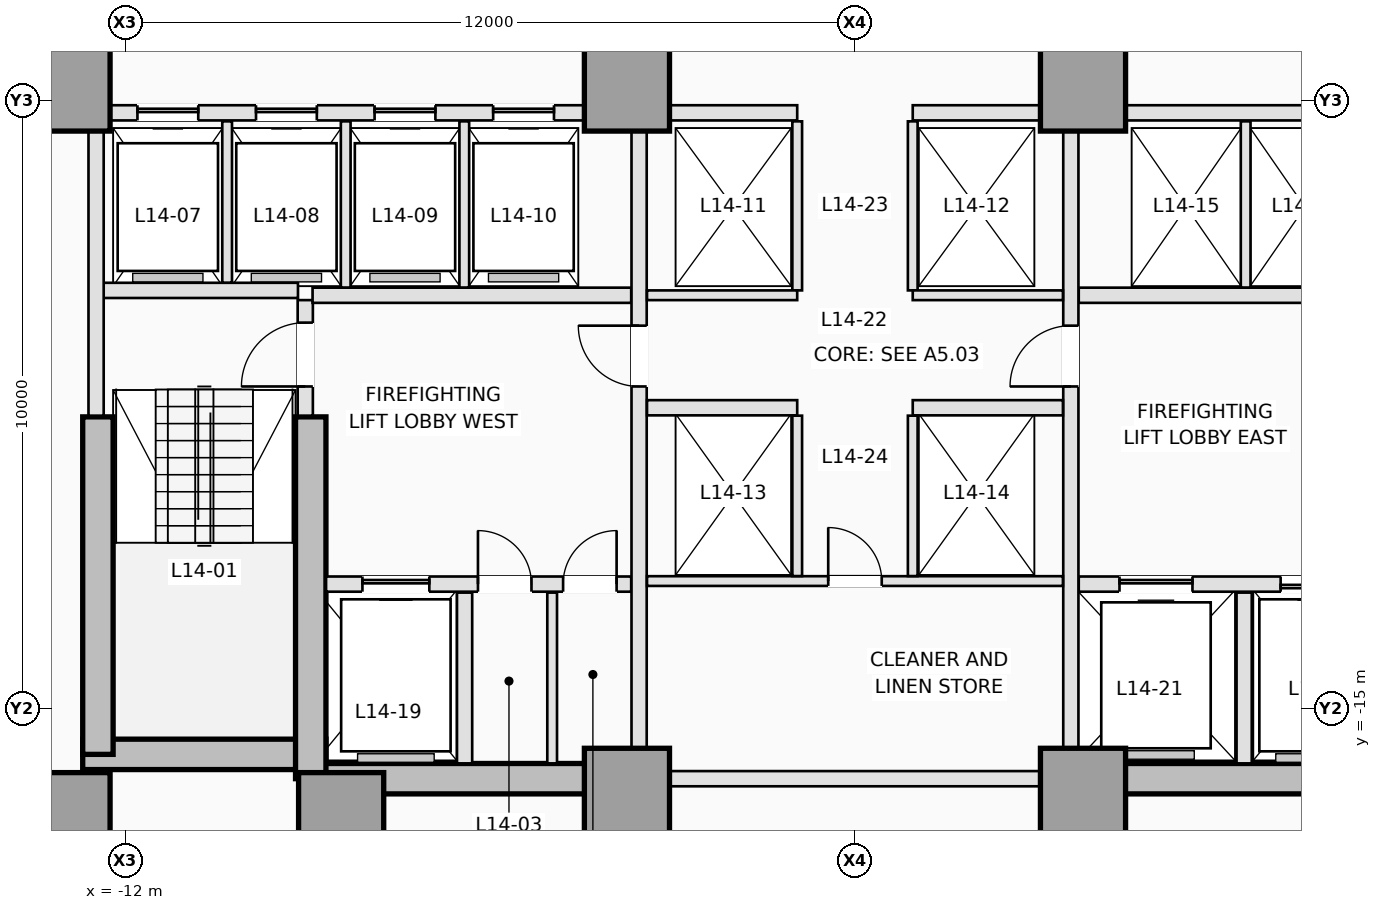
"""IFC4 building model, lengths in metres.
Left out: names, types, materials, properties, quantities, classifications, styles, units other than length and angle.
Written with IfcOpenShell. Run it as: python <this file> out.ifc"""

import sys

from ifc_helpers import new_model, si_unit, direction, frame, frame_2d, origin, origin_2d, place, context, subcontext, project, spatial, rectangle, extrude, element, fill, save


model = new_model("IFC4")
c1 = context("Model", 3, precision=1e-05, world=origin(), true_north=direction((0.0, 1.0)))
c2 = subcontext(c1, "Body", "Model", "MODEL_VIEW")
j1 = project(units=[si_unit("LENGTHUNIT", "METRE"), si_unit("PLANEANGLEUNIT", "RADIAN")], contexts=[c1])
p1 = place(None, origin())
s1 = spatial("IfcSite", under=j1, at=p1, CompositionType="ELEMENT")
p2 = place(p1, origin())
s2 = spatial("IfcBuilding", under=s1, at=p2, CompositionType="ELEMENT")
p3 = place(p2, frame((0.0, 0.0, 55.6)))
s3 = spatial("IfcBuildingStorey", under=s2, at=p3, CompositionType="ELEMENT", Elevation=55.6)
p4 = place(p3, frame((-12.7, -15.75, 0.0), z_axis=(0.0, 0.0, 1.0), x_axis=(1.0, 0.0, 0.0)))
e1 = element("IfcWall", 1, at=p4, inside=s3, PredefinedType="SHEAR", context=c2, shape_type="SweptSolid", body=[
    extrude(rectangle(XDim=4.0, YDim=0.5, at=frame_2d((2.0, 0.0))), origin(), (0.0, 0.0, 1.0), 3.5),
])
for number, where, z_axis, x_axis in (
    (2, (-8.95, -16.15, 0.0), (0.0, 0.0, 1.0), (1.0, 0.0, 0.0)),
    (3, (3.75, -16.15, 0.0), (0.0, 0.0, 1.0), (1.0, 0.0, 0.0)),
):
    element("IfcWall", number, at=place(p3, frame(where, z_axis=z_axis, x_axis=x_axis)), inside=s3, PredefinedType="SHEAR", context=c2, shape_type="SweptSolid", body=[
        extrude(rectangle(XDim=5.2, YDim=0.5, at=frame_2d((2.6, 0.0))), origin(), (0.0, 0.0, 1.0), 3.5),
    ])
p5 = place(p3, frame((-12.45, -15.75, 0.0), z_axis=(0.0, 0.0, 1.0), x_axis=(0.0, 1.0, 0.0)))
e4 = element("IfcWall", 4, at=p5, inside=s3, PredefinedType="SHEAR", context=c2, shape_type="SweptSolid", body=[
    extrude(rectangle(XDim=5.55, YDim=0.5, at=frame_2d((2.775, 0.0))), origin(), (0.0, 0.0, 1.0), 3.5),
])
p6 = place(p3, frame((-8.95, -16.15, 0.0), z_axis=(0.0, 0.0, 1.0), x_axis=(0.0, 1.0, 0.0)))
e5 = element("IfcWall", 5, at=p6, inside=s3, PredefinedType="SHEAR", context=c2, shape_type="SweptSolid", body=[
    extrude(rectangle(XDim=5.95, YDim=0.5, at=frame_2d((2.975, 0.0))), origin(), (0.0, 0.0, 1.0), 3.5),
])
for number, where, z_axis, x_axis in (
    (6, (-12.95, -16.75, 0.0), (0.0, 0.0, 1.0), (1.0, 0.0, 0.0)),
    (7, (-8.45, -16.75, 0.0), (0.0, 0.0, 1.0), (1.0, 0.0, 0.0)),
    (8, (-3.75, -16.35, 0.0), (0.0, 0.0, 1.0), (1.0, 0.0, 0.0)),
    (9, (3.75, -16.35, 0.0), (0.0, 0.0, 1.0), (1.0, 0.0, 0.0)),
    (10, (-12.95, -4.8, 0.0), (0.0, 0.0, 1.0), (1.0, 0.0, 0.0)),
    (11, (-3.75, -4.8, 0.0), (0.0, 0.0, 1.0), (1.0, 0.0, 0.0)),
    (12, (3.75, -4.8, 0.0), (0.0, 0.0, 1.0), (1.0, 0.0, 0.0)),
):
    element("IfcColumn", number, at=place(p3, frame(where, z_axis=z_axis, x_axis=x_axis)), inside=s3, PredefinedType="COLUMN", context=c2, shape_type="SweptSolid", body=[
        extrude(rectangle(XDim=1.4, YDim=1.4, at=origin_2d()), origin(), (0.0, 0.0, 1.0), 3.5),
    ])
p7 = place(p3, frame((-9.04, -10.18, 0.0), z_axis=(0.0, 0.0, 1.0), x_axis=(0.0, 1.0, 0.0)))
e13 = element("IfcWall", 13, at=p7, inside=s3, PredefinedType="PARTITIONING", context=c2, shape_type="SweptSolid", body=[
    extrude(rectangle(XDim=1.9, YDim=0.25, at=frame_2d((0.95, 0.0))), origin(), (0.0, 0.0, 1.0), 3.25),
])
p8 = place(p7, frame((0.48, 0.0, 0.0)))
e14 = element("IfcOpeningElement", 14, at=p8, cuts=e13, PredefinedType="OPENING", context=c2, shape_type="SweptSolid", body=[
    extrude(rectangle(XDim=1.05, YDim=2.15, at=frame_2d((0.525, 1.075))), frame((0.0, 0.135, 0.0), z_axis=(0.0, -1.0, 0.0), x_axis=(1.0, 0.0, 0.0)), (0.0, 0.0, 1.0), 0.27),
])
p9 = place(p3, frame((-12.38, -8.12, 0.0), z_axis=(0.0, 0.0, 1.0), x_axis=(1.0, 0.0, 0.0)))
e15 = element("IfcWall", 15, at=p9, inside=s3, PredefinedType="PARTITIONING", context=c2, shape_type="SweptSolid", body=[
    extrude(rectangle(XDim=3.22, YDim=0.25, at=frame_2d((1.61, 0.0))), origin(), (0.0, 0.0, 1.0), 3.25),
])
p10 = place(p3, frame((-12.48, -10.18, 0.0), z_axis=(0.0, 0.0, 1.0), x_axis=(0.0, 1.0, 0.0)))
e16 = element("IfcWall", 16, at=p10, inside=s3, PredefinedType="PARTITIONING", context=c2, shape_type="SweptSolid", body=[
    extrude(rectangle(XDim=4.678, YDim=0.25, at=frame_2d((2.339, 0.0))), origin(), (0.0, 0.0, 1.0), 3.25),
])
p11 = place(p3, frame((-8.698, -12.95, 0.0), z_axis=(0.0, 0.0, 1.0), x_axis=(1.0, 0.0, 0.0)))
e17 = element("IfcWall", 17, at=p11, inside=s3, PredefinedType="PARTITIONING", context=c2, shape_type="SweptSolid", body=[
    extrude(rectangle(XDim=5.018, YDim=0.25, at=frame_2d((2.509, 0.0))), origin(), (0.0, 0.0, 1.0), 3.25),
])
p12 = place(p11, frame((0.598, 0.0, 0.0)))
e18 = element("IfcOpeningElement", 18, at=p12, cuts=e17, PredefinedType="OPENING", context=c2, shape_type="SweptSolid", body=[
    extrude(rectangle(XDim=1.1, YDim=2.15, at=frame_2d((0.55, 1.075))), frame((0.0, 0.135, 0.0), z_axis=(0.0, -1.0, 0.0), x_axis=(1.0, 0.0, 0.0)), (0.0, 0.0, 1.0), 0.27),
])
p13 = place(p11, frame((2.498, 0.0, 0.0)))
e19 = element("IfcOpeningElement", 19, at=p13, cuts=e17, PredefinedType="OPENING", context=c2, shape_type="SweptSolid", body=[
    extrude(rectangle(XDim=0.88, YDim=2.1, at=frame_2d((0.44, 1.05))), frame((0.0, 0.135, 0.0), z_axis=(0.0, -1.0, 0.0), x_axis=(1.0, 0.0, 0.0)), (0.0, 0.0, 1.0), 0.27),
])
p14 = place(p11, frame((3.898, 0.0, 0.0)))
e20 = element("IfcOpeningElement", 20, at=p14, cuts=e17, PredefinedType="OPENING", context=c2, shape_type="SweptSolid", body=[
    extrude(rectangle(XDim=0.88, YDim=2.1, at=frame_2d((0.44, 1.05))), frame((0.0, 0.135, 0.0), z_axis=(0.0, -1.0, 0.0), x_axis=(1.0, 0.0, 0.0)), (0.0, 0.0, 1.0), 0.27),
])
p15 = place(p3, frame((3.68, -12.95, 0.0), z_axis=(0.0, 0.0, 1.0), x_axis=(1.0, 0.0, 0.0)))
e21 = element("IfcWall", 21, at=p15, inside=s3, PredefinedType="PARTITIONING", context=c2, shape_type="SweptSolid", body=[
    extrude(rectangle(XDim=5.018, YDim=0.25, at=frame_2d((2.509, 0.0))), origin(), (0.0, 0.0, 1.0), 3.25),
])
p16 = place(p15, frame((3.32, 0.0, 0.0)))
e22 = element("IfcOpeningElement", 22, at=p16, cuts=e21, PredefinedType="OPENING", context=c2, shape_type="SweptSolid", body=[
    extrude(rectangle(XDim=1.1, YDim=2.15, at=frame_2d((0.55, 1.075))), frame((0.0, 0.135, 0.0), z_axis=(0.0, -1.0, 0.0), x_axis=(1.0, 0.0, 0.0)), (0.0, 0.0, 1.0), 0.27),
])
p17 = place(p15, frame((0.67, 0.0, 0.0)))
e23 = element("IfcOpeningElement", 23, at=p17, cuts=e21, PredefinedType="OPENING", context=c2, shape_type="SweptSolid", body=[
    extrude(rectangle(XDim=1.2, YDim=2.15, at=frame_2d((0.6, 1.075))), frame((0.0, 0.135, 0.0), z_axis=(0.0, -1.0, 0.0), x_axis=(1.0, 0.0, 0.0)), (0.0, 0.0, 1.0), 0.27),
])
p18 = place(p3, frame((-6.42, -15.898, 0.0), z_axis=(0.0, 0.0, 1.0), x_axis=(0.0, 1.0, 0.0)))
e24 = element("IfcWall", 24, at=p18, inside=s3, PredefinedType="PARTITIONING", context=c2, shape_type="SweptSolid", body=[
    extrude(rectangle(XDim=2.808, YDim=0.25, at=frame_2d((1.404, 0.0))), origin(), (0.0, 0.0, 1.0), 3.25),
])
p19 = place(p3, frame((-4.98, -15.898, 0.0), z_axis=(0.0, 0.0, 1.0), x_axis=(0.0, 1.0, 0.0)))
e25 = element("IfcWall", 25, at=p19, inside=s3, PredefinedType="PARTITIONING", context=c2, shape_type="SweptSolid", body=[
    extrude(rectangle(XDim=2.808, YDim=0.16, at=frame_2d((1.404, 0.0))), origin(), (0.0, 0.0, 1.0), 3.25),
])
p20 = place(p3, frame((6.4, -15.898, 0.0), z_axis=(0.0, 0.0, 1.0), x_axis=(0.0, 1.0, 0.0)))
e26 = element("IfcWall", 26, at=p20, inside=s3, PredefinedType="PARTITIONING", context=c2, shape_type="SweptSolid", body=[
    extrude(rectangle(XDim=2.808, YDim=0.25, at=frame_2d((1.404, 0.0))), origin(), (0.0, 0.0, 1.0), 3.25),
])
for number, where, z_axis, x_axis in (
    (27, (-8.92, -8.2, 0.0), (0.0, 0.0, 1.0), (1.0, 0.0, 0.0)),
    (28, (3.68, -8.2, 0.0), (0.0, 0.0, 1.0), (1.0, 0.0, 0.0)),
):
    element("IfcWall", number, at=place(p3, frame(where, z_axis=z_axis, x_axis=x_axis)), inside=s3, PredefinedType="PARTITIONING", context=c2, shape_type="SweptSolid", body=[
        extrude(rectangle(XDim=5.24, YDim=0.25, at=frame_2d((2.62, 0.0))), origin(), (0.0, 0.0, 1.0), 3.25),
    ])
p21 = place(p3, frame((-3.55, -15.648, 0.0), z_axis=(0.0, 0.0, 1.0), x_axis=(0.0, 1.0, 0.0)))
e29 = element("IfcWall", 29, at=p21, inside=s3, PredefinedType="PARTITIONING", context=c2, shape_type="SweptSolid", body=[
    extrude(rectangle(XDim=10.146, YDim=0.25, at=frame_2d((5.073, 0.0))), origin(), (0.0, 0.0, 1.0), 3.25),
])
p22 = place(p21, frame((5.948, 0.0, 0.0)))
e30 = element("IfcOpeningElement", 30, at=p22, cuts=e29, PredefinedType="OPENING", context=c2, shape_type="SweptSolid", body=[
    extrude(rectangle(XDim=1.0, YDim=2.15, at=frame_2d((0.5, 1.075))), frame((0.0, 0.135, 0.0), z_axis=(0.0, -1.0, 0.0), x_axis=(1.0, 0.0, 0.0)), (0.0, 0.0, 1.0), 0.27),
])
p23 = place(p3, frame((3.55, -15.648, 0.0), z_axis=(0.0, 0.0, 1.0), x_axis=(0.0, 1.0, 0.0)))
e31 = element("IfcWall", 31, at=p23, inside=s3, PredefinedType="PARTITIONING", context=c2, shape_type="SweptSolid", body=[
    extrude(rectangle(XDim=10.146, YDim=0.25, at=frame_2d((5.073, 0.0))), origin(), (0.0, 0.0, 1.0), 3.25),
])
p24 = place(p23, frame((5.948, 0.0, 0.0)))
e32 = element("IfcOpeningElement", 32, at=p24, cuts=e31, PredefinedType="OPENING", context=c2, shape_type="SweptSolid", body=[
    extrude(rectangle(XDim=1.0, YDim=2.15, at=frame_2d((0.5, 1.075))), frame((0.0, 0.135, 0.0), z_axis=(0.0, -1.0, 0.0), x_axis=(1.0, 0.0, 0.0)), (0.0, 0.0, 1.0), 0.27),
])
p25 = place(p3, frame((-12.248, -5.2, 0.0), z_axis=(0.0, 0.0, 1.0), x_axis=(1.0, 0.0, 0.0)))
e33 = element("IfcWall", 33, at=p25, inside=s3, PredefinedType="PARTITIONING", context=c2, shape_type="SweptSolid", body=[
    extrude(rectangle(XDim=7.796, YDim=0.25, at=frame_2d((3.898, 0.0))), origin(), (0.0, 0.0, 1.0), 3.25),
])
p26 = place(p25, frame((0.448, 0.0, 0.0)))
e34 = element("IfcOpeningElement", 34, at=p26, cuts=e33, PredefinedType="OPENING", context=c2, shape_type="SweptSolid", body=[
    extrude(rectangle(XDim=1.0, YDim=2.15, at=frame_2d((0.5, 1.075))), frame((0.0, 0.135, 0.0), z_axis=(0.0, -1.0, 0.0), x_axis=(1.0, 0.0, 0.0)), (0.0, 0.0, 1.0), 0.27),
])
p27 = place(p25, frame((2.398, 0.0, 0.0)))
e35 = element("IfcOpeningElement", 35, at=p27, cuts=e33, PredefinedType="OPENING", context=c2, shape_type="SweptSolid", body=[
    extrude(rectangle(XDim=1.0, YDim=2.15, at=frame_2d((0.5, 1.075))), frame((0.0, 0.135, 0.0), z_axis=(0.0, -1.0, 0.0), x_axis=(1.0, 0.0, 0.0)), (0.0, 0.0, 1.0), 0.27),
])
p28 = place(p25, frame((4.348, 0.0, 0.0)))
e36 = element("IfcOpeningElement", 36, at=p28, cuts=e33, PredefinedType="OPENING", context=c2, shape_type="SweptSolid", body=[
    extrude(rectangle(XDim=1.0, YDim=2.15, at=frame_2d((0.5, 1.075))), frame((0.0, 0.135, 0.0), z_axis=(0.0, -1.0, 0.0), x_axis=(1.0, 0.0, 0.0)), (0.0, 0.0, 1.0), 0.27),
])
p29 = place(p25, frame((6.298, 0.0, 0.0)))
e37 = element("IfcOpeningElement", 37, at=p29, cuts=e33, PredefinedType="OPENING", context=c2, shape_type="SweptSolid", body=[
    extrude(rectangle(XDim=1.0, YDim=2.15, at=frame_2d((0.5, 1.075))), frame((0.0, 0.135, 0.0), z_axis=(0.0, -1.0, 0.0), x_axis=(1.0, 0.0, 0.0)), (0.0, 0.0, 1.0), 0.27),
])
p30 = place(p3, frame((4.452, -5.2, 0.0), z_axis=(0.0, 0.0, 1.0), x_axis=(1.0, 0.0, 0.0)))
e38 = element("IfcWall", 38, at=p30, inside=s3, PredefinedType="PARTITIONING", context=c2, shape_type="SweptSolid", body=[
    extrude(rectangle(XDim=7.796, YDim=0.25, at=frame_2d((3.898, 0.0))), origin(), (0.0, 0.0, 1.0), 3.25),
])
for number, where, z_axis, x_axis in (
    (39, (-3.048, -5.2, 0.0), (0.0, 0.0, 1.0), (1.0, 0.0, 0.0)),
    (40, (0.95, -5.2, 0.0), (0.0, 0.0, 1.0), (1.0, 0.0, 0.0)),
):
    element("IfcWall", number, at=place(p3, frame(where, z_axis=z_axis, x_axis=x_axis)), inside=s3, PredefinedType="PARTITIONING", context=c2, shape_type="SweptSolid", body=[
        extrude(rectangle(XDim=2.098, YDim=0.25, at=frame_2d((1.049, 0.0))), origin(), (0.0, 0.0, 1.0), 3.25),
    ])
p31 = place(p3, frame((-10.325, -7.993, 0.0), z_axis=(0.0, 0.0, 1.0), x_axis=(0.0, 1.0, 0.0)))
e41 = element("IfcWall", 41, at=p31, inside=s3, PredefinedType="PARTITIONING", context=c2, shape_type="SweptSolid", body=[
    extrude(rectangle(XDim=2.653, YDim=0.16, at=frame_2d((1.326, 0.0))), origin(), (0.0, 0.0, 1.0), 3.25),
])
for number, where, z_axis, x_axis in (
    (42, (-8.375, -8.073, 0.0), (0.0, 0.0, 1.0), (0.0, 1.0, 0.0)),
    (43, (-6.425, -8.073, 0.0), (0.0, 0.0, 1.0), (0.0, 1.0, 0.0)),
    (44, (6.425, -8.073, 0.0), (0.0, 0.0, 1.0), (0.0, 1.0, 0.0)),
):
    element("IfcWall", number, at=place(p3, frame(where, z_axis=z_axis, x_axis=x_axis)), inside=s3, PredefinedType="PARTITIONING", context=c2, shape_type="SweptSolid", body=[
        extrude(rectangle(XDim=2.733, YDim=0.16, at=frame_2d((1.366, 0.0))), origin(), (0.0, 0.0, 1.0), 3.25),
    ])
p32 = place(p3, frame((-3.048, -16.15, 0.0), z_axis=(0.0, 0.0, 1.0), x_axis=(1.0, 0.0, 0.0)))
e45 = element("IfcWall", 45, at=p32, inside=s3, PredefinedType="PARTITIONING", context=c2, shape_type="SweptSolid", body=[
    extrude(rectangle(XDim=6.096, YDim=0.25, at=frame_2d((3.048, 0.0))), origin(), (0.0, 0.0, 1.0), 2.3),
])
for number, where, z_axis, x_axis in (
    (46, (-0.95, -8.12, 0.0), (0.0, 0.0, 1.0), (0.0, 1.0, 0.0)),
    (47, (0.95, -8.12, 0.0), (0.0, 0.0, 1.0), (0.0, 1.0, 0.0)),
):
    element("IfcWall", number, at=place(p3, frame(where, z_axis=z_axis, x_axis=x_axis)), inside=s3, PredefinedType="PARTITIONING", context=c2, shape_type="SweptSolid", body=[
        extrude(rectangle(XDim=2.78, YDim=0.16, at=frame_2d((1.39, 0.0))), origin(), (0.0, 0.0, 1.0), 3.25),
    ])
for number, where, z_axis, x_axis in (
    (48, (-3.42, -8.2, 0.0), (0.0, 0.0, 1.0), (1.0, 0.0, 0.0)),
    (49, (0.95, -8.2, 0.0), (0.0, 0.0, 1.0), (1.0, 0.0, 0.0)),
):
    element("IfcWall", number, at=place(p3, frame(where, z_axis=z_axis, x_axis=x_axis)), inside=s3, PredefinedType="PARTITIONING", context=c2, shape_type="SweptSolid", body=[
        extrude(rectangle(XDim=2.47, YDim=0.16, at=frame_2d((1.235, 0.0))), origin(), (0.0, 0.0, 1.0), 3.25),
    ])
for number, where, z_axis, x_axis in (
    (50, (-3.42, -10.05, 0.0), (0.0, 0.0, 1.0), (1.0, 0.0, 0.0)),
    (51, (0.95, -10.05, 0.0), (0.0, 0.0, 1.0), (1.0, 0.0, 0.0)),
):
    element("IfcWall", number, at=place(p3, frame(where, z_axis=z_axis, x_axis=x_axis)), inside=s3, PredefinedType="PARTITIONING", context=c2, shape_type="SweptSolid", body=[
        extrude(rectangle(XDim=2.47, YDim=0.25, at=frame_2d((1.235, 0.0))), origin(), (0.0, 0.0, 1.0), 3.25),
    ])
p33 = place(p3, frame((-3.42, -12.9, 0.0), z_axis=(0.0, 0.0, 1.0), x_axis=(1.0, 0.0, 0.0)))
e52 = element("IfcWall", 52, at=p33, inside=s3, PredefinedType="PARTITIONING", context=c2, shape_type="SweptSolid", body=[
    extrude(rectangle(XDim=6.84, YDim=0.16, at=frame_2d((3.42, 0.0))), origin(), (0.0, 0.0, 1.0), 3.25),
])
p34 = place(p33, frame((2.98, 0.0, 0.0)))
e53 = element("IfcOpeningElement", 53, at=p34, cuts=e52, PredefinedType="OPENING", context=c2, shape_type="SweptSolid", body=[
    extrude(rectangle(XDim=0.88, YDim=2.12, at=frame_2d((0.44, 1.06))), frame((0.0, 0.09, 0.0), z_axis=(0.0, -1.0, 0.0), x_axis=(1.0, 0.0, 0.0)), (0.0, 0.0, 1.0), 0.18),
])
for number, where, z_axis, x_axis in (
    (54, (-0.95, -12.818, 0.0), (0.0, 0.0, 1.0), (0.0, 1.0, 0.0)),
    (55, (0.95, -12.818, 0.0), (0.0, 0.0, 1.0), (0.0, 1.0, 0.0)),
):
    element("IfcWall", number, at=place(p3, frame(where, z_axis=z_axis, x_axis=x_axis)), inside=s3, PredefinedType="PARTITIONING", context=c2, shape_type="SweptSolid", body=[
        extrude(rectangle(XDim=2.638, YDim=0.16, at=frame_2d((1.319, 0.0))), origin(), (0.0, 0.0, 1.0), 3.25),
    ])
p35 = place(p26, origin())
e56 = element("IfcDoor", 56, at=p35, inside=s3, OperationType="SLIDING_TO_LEFT", PredefinedType="DOOR", context=c2, shape_type="SweptSolid", body=[
    extrude(rectangle(XDim=1.0, YDim=2.15, at=frame_2d((0.5, 1.075))), frame((0.0, 0.025, 0.0), z_axis=(0.0, -1.0, 0.0), x_axis=(1.0, 0.0, 0.0)), (0.0, 0.0, 1.0), 0.05),
])
fill(e34, e56)
p36 = place(p27, origin())
e57 = element("IfcDoor", 57, at=p36, inside=s3, OperationType="SLIDING_TO_LEFT", PredefinedType="DOOR", context=c2, shape_type="SweptSolid", body=[
    extrude(rectangle(XDim=1.0, YDim=2.15, at=frame_2d((0.5, 1.075))), frame((0.0, 0.025, 0.0), z_axis=(0.0, -1.0, 0.0), x_axis=(1.0, 0.0, 0.0)), (0.0, 0.0, 1.0), 0.05),
])
fill(e35, e57)
p37 = place(p28, origin())
e58 = element("IfcDoor", 58, at=p37, inside=s3, OperationType="SLIDING_TO_LEFT", PredefinedType="DOOR", context=c2, shape_type="SweptSolid", body=[
    extrude(rectangle(XDim=1.0, YDim=2.15, at=frame_2d((0.5, 1.075))), frame((0.0, 0.025, 0.0), z_axis=(0.0, -1.0, 0.0), x_axis=(1.0, 0.0, 0.0)), (0.0, 0.0, 1.0), 0.05),
])
fill(e36, e58)
p38 = place(p29, origin())
e59 = element("IfcDoor", 59, at=p38, inside=s3, OperationType="SLIDING_TO_LEFT", PredefinedType="DOOR", context=c2, shape_type="SweptSolid", body=[
    extrude(rectangle(XDim=1.0, YDim=2.15, at=frame_2d((0.5, 1.075))), frame((0.0, 0.025, 0.0), z_axis=(0.0, -1.0, 0.0), x_axis=(1.0, 0.0, 0.0)), (0.0, 0.0, 1.0), 0.05),
])
fill(e37, e59)
p39 = place(p12, origin())
e60 = element("IfcDoor", 60, at=p39, inside=s3, OperationType="SLIDING_TO_LEFT", PredefinedType="DOOR", context=c2, shape_type="SweptSolid", body=[
    extrude(rectangle(XDim=1.1, YDim=2.15, at=frame_2d((0.55, 1.075))), frame((0.0, 0.025, 0.0), z_axis=(0.0, -1.0, 0.0), x_axis=(1.0, 0.0, 0.0)), (0.0, 0.0, 1.0), 0.05),
])
fill(e18, e60)
p40 = place(p16, origin())
e61 = element("IfcDoor", 61, at=p40, inside=s3, OperationType="SLIDING_TO_RIGHT", PredefinedType="DOOR", context=c2, shape_type="SweptSolid", body=[
    extrude(rectangle(XDim=1.1, YDim=2.15, at=frame_2d((0.55, 1.075))), frame((0.0, 0.025, 0.0), z_axis=(0.0, -1.0, 0.0), x_axis=(1.0, 0.0, 0.0)), (0.0, 0.0, 1.0), 0.05),
])
fill(e22, e61)
p41 = place(p17, origin())
e62 = element("IfcDoor", 62, at=p41, inside=s3, OperationType="SLIDING_TO_LEFT", PredefinedType="DOOR", context=c2, shape_type="SweptSolid", body=[
    extrude(rectangle(XDim=1.2, YDim=2.15, at=frame_2d((0.6, 1.075))), frame((0.0, 0.025, 0.0), z_axis=(0.0, -1.0, 0.0), x_axis=(1.0, 0.0, 0.0)), (0.0, 0.0, 1.0), 0.05),
])
fill(e23, e62)
p42 = place(p8, origin())
e63 = element("IfcDoor", 63, at=p42, inside=s3, OperationType="SINGLE_SWING_LEFT", PredefinedType="DOOR", context=c2, shape_type="SweptSolid", body=[
    extrude(rectangle(XDim=1.05, YDim=2.15, at=frame_2d((0.525, 1.075))), frame((0.0, 0.025, 0.0), z_axis=(0.0, -1.0, 0.0), x_axis=(1.0, 0.0, 0.0)), (0.0, 0.0, 1.0), 0.05),
])
fill(e14, e63)
p43 = place(p13, origin())
e64 = element("IfcDoor", 64, at=p43, inside=s3, OperationType="SINGLE_SWING_LEFT", PredefinedType="TRAPDOOR", context=c2, shape_type="SweptSolid", body=[
    extrude(rectangle(XDim=0.88, YDim=2.1, at=frame_2d((0.44, 1.05))), frame((0.0, 0.025, 0.0), z_axis=(0.0, -1.0, 0.0), x_axis=(1.0, 0.0, 0.0)), (0.0, 0.0, 1.0), 0.05),
])
fill(e19, e64)
p44 = place(p14, origin())
e65 = element("IfcDoor", 65, at=p44, inside=s3, OperationType="SINGLE_SWING_RIGHT", PredefinedType="TRAPDOOR", context=c2, shape_type="SweptSolid", body=[
    extrude(rectangle(XDim=0.88, YDim=2.1, at=frame_2d((0.44, 1.05))), frame((0.0, 0.025, 0.0), z_axis=(0.0, -1.0, 0.0), x_axis=(1.0, 0.0, 0.0)), (0.0, 0.0, 1.0), 0.05),
])
fill(e20, e65)
p45 = place(p22, origin())
e66 = element("IfcDoor", 66, at=p45, inside=s3, OperationType="SINGLE_SWING_RIGHT", PredefinedType="DOOR", context=c2, shape_type="SweptSolid", body=[
    extrude(rectangle(XDim=1.0, YDim=2.15, at=frame_2d((0.5, 1.075))), frame((0.0, 0.025, 0.0), z_axis=(0.0, -1.0, 0.0), x_axis=(1.0, 0.0, 0.0)), (0.0, 0.0, 1.0), 0.05),
])
fill(e30, e66)
p46 = place(p24, origin())
e67 = element("IfcDoor", 67, at=p46, inside=s3, OperationType="SINGLE_SWING_LEFT", PredefinedType="DOOR", context=c2, shape_type="SweptSolid", body=[
    extrude(rectangle(XDim=1.0, YDim=2.15, at=frame_2d((0.5, 1.075))), frame((0.0, 0.025, 0.0), z_axis=(0.0, -1.0, 0.0), x_axis=(1.0, 0.0, 0.0)), (0.0, 0.0, 1.0), 0.05),
])
fill(e32, e67)
p47 = place(p34, origin())
e68 = element("IfcDoor", 68, at=p47, inside=s3, OperationType="SINGLE_SWING_LEFT", PredefinedType="DOOR", context=c2, shape_type="SweptSolid", body=[
    extrude(rectangle(XDim=0.88, YDim=2.12, at=frame_2d((0.44, 1.06))), frame((0.0, 0.025, 0.0), z_axis=(0.0, -1.0, 0.0), x_axis=(1.0, 0.0, 0.0)), (0.0, 0.0, 1.0), 0.05),
])
fill(e53, e68)
save(model, sys.argv[1])
